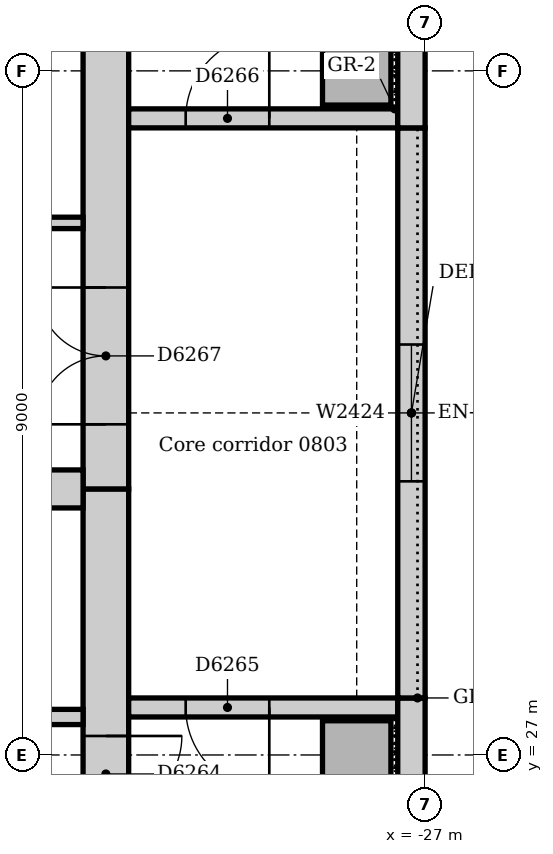
"""IFC4 building model, lengths in metres.
Left out: names, types, materials, properties, quantities, classifications, styles, units other than length and angle.
Written with IfcOpenShell. Run it as: python <this file> out.ifc"""

import sys

from ifc_helpers import new_model, si_unit, direction, frame, frame_2d, origin, origin_2d, place, context, subcontext, project, spatial, rectangle, extrude, element, fill, save


model = new_model("IFC4")
c1 = context("Model", 3, precision=1e-05, world=origin(), true_north=direction((0.0, 1.0)))
c2 = subcontext(c1, "Body", "Model", "MODEL_VIEW")
j1 = project(units=[si_unit("LENGTHUNIT", "METRE"), si_unit("PLANEANGLEUNIT", "RADIAN")], contexts=[c1])
p1 = place(None, origin())
s1 = spatial("IfcSite", under=j1, at=p1, CompositionType="ELEMENT")
p2 = place(p1, origin())
s2 = spatial("IfcBuilding", under=s1, at=p2, CompositionType="ELEMENT")
p3 = place(p2, frame((0.0, 0.0, 38.0)))
s3 = spatial("IfcBuildingStorey", under=s2, at=p3, CompositionType="ELEMENT", Elevation=38.0)
p4 = place(p3, frame((-31.2, 21.0, 0.0), z_axis=(0.0, 0.0, 1.0), x_axis=(0.0, 1.0, 0.0)))
e1 = element("IfcWall", 1, at=p4, inside=s3, PredefinedType="SOLIDWALL", context=c2, shape_type="SweptSolid", body=[
    extrude(rectangle(XDim=9.5, YDim=0.6, at=frame_2d((4.75, 0.0))), origin(), (0.0, 0.0, 1.0), 4.0),
])
p5 = place(p4, frame((5.25, 0.0, 0.0)))
e2 = element("IfcOpeningElement", 2, at=p5, cuts=e1, PredefinedType="OPENING", context=c2, shape_type="SweptSolid", body=[
    extrude(rectangle(XDim=1.0, YDim=2.1, at=frame_2d((0.5, 1.05))), frame((0.0, 0.31, 0.0), z_axis=(0.0, -1.0, 0.0), x_axis=(1.0, 0.0, 0.0)), (0.0, 0.0, 1.0), 0.62),
])
p6 = place(p3, frame((-31.2, 30.5, 0.0), z_axis=(0.0, 0.0, 1.0), x_axis=(0.0, 1.0, 0.0)))
e3 = element("IfcWall", 3, at=p6, inside=s3, PredefinedType="SOLIDWALL", context=c2, shape_type="SweptSolid", body=[
    extrude(rectangle(XDim=11.5, YDim=0.6, at=frame_2d((5.75, 0.0))), origin(), (0.0, 0.0, 1.0), 4.0),
])
p7 = place(p6, frame((0.85, 0.0, 0.0)))
e4 = element("IfcOpeningElement", 4, at=p7, cuts=e3, PredefinedType="OPENING", context=c2, shape_type="SweptSolid", body=[
    extrude(rectangle(XDim=1.8, YDim=2.1, at=frame_2d((0.9, 1.05))), frame((0.0, 0.31, 0.0), z_axis=(0.0, -1.0, 0.0), x_axis=(1.0, 0.0, 0.0)), (0.0, 0.0, 1.0), 0.62),
])
p8 = place(p3, frame((-42.0, 30.5, 0.0), z_axis=(0.0, 0.0, 1.0), x_axis=(1.0, 0.0, 0.0)))
e5 = element("IfcWall", 5, at=p8, inside=s3, PredefinedType="SOLIDWALL", context=c2, shape_type="SweptSolid", body=[
    extrude(rectangle(XDim=10.5, YDim=0.5, at=frame_2d((5.25, 0.0))), origin(), (0.0, 0.0, 1.0), 4.0),
])
p9 = place(p3, frame((-27.36, 27.625, 0.0), z_axis=(0.0, 0.0, 1.0), x_axis=(-1.0, 0.0, 0.0)))
e6 = element("IfcWall", 6, at=p9, inside=s3, PredefinedType="SOLIDWALL", context=c2, shape_type="SweptSolid", body=[
    extrude(rectangle(XDim=3.54, YDim=0.25, at=frame_2d((1.77, 0.0))), origin(), (0.0, 0.0, 1.0), 4.0),
])
p10 = place(p9, frame((1.69, 0.0, 0.0)))
e7 = element("IfcOpeningElement", 7, at=p10, cuts=e6, PredefinedType="OPENING", context=c2, shape_type="SweptSolid", body=[
    extrude(rectangle(XDim=1.1, YDim=2.1, at=frame_2d((0.55, 1.05))), frame((0.0, 0.135, 0.0), z_axis=(0.0, -1.0, 0.0), x_axis=(1.0, 0.0, 0.0)), (0.0, 0.0, 1.0), 0.27),
])
p11 = place(p3, frame((-30.9, 35.375, 0.0), z_axis=(0.0, 0.0, 1.0), x_axis=(1.0, 0.0, 0.0)))
e8 = element("IfcWall", 8, at=p11, inside=s3, PredefinedType="SOLIDWALL", context=c2, shape_type="SweptSolid", body=[
    extrude(rectangle(XDim=3.54, YDim=0.25, at=frame_2d((1.77, 0.0))), origin(), (0.0, 0.0, 1.0), 4.0),
])
p12 = place(p11, frame((0.75, 0.0, 0.0)))
e9 = element("IfcOpeningElement", 9, at=p12, cuts=e8, PredefinedType="OPENING", context=c2, shape_type="SweptSolid", body=[
    extrude(rectangle(XDim=1.1, YDim=2.1, at=frame_2d((0.55, 1.05))), frame((0.0, 0.135, 0.0), z_axis=(0.0, -1.0, 0.0), x_axis=(1.0, 0.0, 0.0)), (0.0, 0.0, 1.0), 0.27),
])
for number, where, z_axis, x_axis in (
    (10, (-27.9, 27.0, 0.0), (0.0, 0.0, 1.0), (1.0, 0.0, 0.0)),
    (11, (-27.9, 36.0, 0.0), (0.0, 0.0, 1.0), (1.0, 0.0, 0.0)),
):
    element("IfcColumn", number, at=place(p3, frame(where, z_axis=z_axis, x_axis=x_axis)), inside=s3, PredefinedType="COLUMN", context=c2, shape_type="SweptSolid", body=[
        extrude(rectangle(XDim=0.9, YDim=0.9, at=origin_2d()), origin(), (0.0, 0.0, 1.0), 4.0),
    ])
p13 = place(p3, frame((-27.18, 21.0, 0.0), z_axis=(0.0, 0.0, 1.0), x_axis=(0.0, 1.0, 0.0)))
e12 = element("IfcWall", 12, at=p13, inside=s3, PredefinedType="STANDARD", context=c2, shape_type="SweptSolid", body=[
    extrude(rectangle(XDim=6.75, YDim=0.36, at=frame_2d((3.375, 0.0))), origin(), (0.0, 0.0, 1.0), 3.85),
])
p14 = place(p3, frame((-27.18, 27.75, 0.0), z_axis=(0.0, 0.0, 1.0), x_axis=(0.0, 1.0, 0.0)))
e13 = element("IfcWall", 13, at=p14, inside=s3, PredefinedType="STANDARD", context=c2, shape_type="SweptSolid", body=[
    extrude(rectangle(XDim=7.5, YDim=0.36, at=frame_2d((3.75, 0.0))), origin(), (0.0, 0.0, 1.0), 3.85),
])
p15 = place(p14, frame((2.85, 0.0, 1.2)))
e14 = element("IfcOpeningElement", 14, at=p15, cuts=e13, PredefinedType="OPENING", context=c2, shape_type="SweptSolid", body=[
    extrude(rectangle(XDim=1.8, YDim=1.2, at=frame_2d((0.9, 0.6))), frame((0.0, 0.19, 0.0), z_axis=(0.0, -1.0, 0.0), x_axis=(1.0, 0.0, 0.0)), (0.0, 0.0, 1.0), 0.38),
])
p16 = place(p3, frame((-27.18, 35.25, 0.0), z_axis=(0.0, 0.0, 1.0), x_axis=(0.0, 1.0, 0.0)))
e15 = element("IfcWall", 15, at=p16, inside=s3, PredefinedType="STANDARD", context=c2, shape_type="SweptSolid", body=[
    extrude(rectangle(XDim=5.507, YDim=0.36, at=frame_2d((2.754, 0.0))), origin(), (0.0, 0.0, 1.0), 3.85),
])
p17 = place(p3, frame((-34.9, 27.5, 0.0), z_axis=(0.0, 0.0, 1.0), x_axis=(1.0, 0.0, 0.0)))
e16 = element("IfcWall", 16, at=p17, inside=s3, PredefinedType="SOLIDWALL", context=c2, shape_type="SweptSolid", body=[
    extrude(rectangle(XDim=3.4, YDim=0.2, at=frame_2d((1.7, 0.0))), origin(), (0.0, 0.0, 1.0), 4.0),
])
p18 = place(p17, frame((1.1, 0.0, 0.0)))
e17 = element("IfcOpeningElement", 17, at=p18, cuts=e16, PredefinedType="OPENING", context=c2, shape_type="SweptSolid", body=[
    extrude(rectangle(XDim=1.1, YDim=2.1, at=frame_2d((0.55, 1.05))), frame((0.0, 0.11, 0.0), z_axis=(0.0, -1.0, 0.0), x_axis=(1.0, 0.0, 0.0)), (0.0, 0.0, 1.0), 0.22),
])
p19 = place(p3, frame((-34.075, 34.0, 0.0), z_axis=(0.0, 0.0, 1.0), x_axis=(1.0, 0.0, 0.0)))
e18 = element("IfcWall", 18, at=p19, inside=s3, PredefinedType="SOLIDWALL", context=c2, shape_type="SweptSolid", body=[
    extrude(rectangle(XDim=2.575, YDim=0.15, at=frame_2d((1.288, 0.0))), origin(), (0.0, 0.0, 1.0), 4.0),
])
p20 = place(p15, origin())
e19 = element("IfcWindow", 19, at=p20, inside=s3, PartitioningType="SINGLE_PANEL", PredefinedType="WINDOW", context=c2, shape_type="SweptSolid", body=[
    extrude(rectangle(XDim=1.8, YDim=1.2, at=frame_2d((0.9, 0.6))), frame((0.0, 0.13, 0.0), z_axis=(0.0, -1.0, 0.0), x_axis=(1.0, 0.0, 0.0)), (0.0, 0.0, 1.0), 0.06),
])
fill(e14, e19)
p21 = place(p5, frame((1.0, 0.0, 0.0), z_axis=(0.0, 0.0, 1.0), x_axis=(-1.0, 0.0, 0.0)))
e20 = element("IfcDoor", 20, at=p21, inside=s3, OperationType="SINGLE_SWING_LEFT", PredefinedType="DOOR", context=c2, shape_type="SweptSolid", body=[
    extrude(rectangle(XDim=1.0, YDim=2.1, at=frame_2d((0.5, 1.05))), frame((0.0, 0.025, 0.0), z_axis=(0.0, -1.0, 0.0), x_axis=(1.0, 0.0, 0.0)), (0.0, 0.0, 1.0), 0.05),
])
fill(e2, e20)
p22 = place(p10, origin())
e21 = element("IfcDoor", 21, at=p22, inside=s3, OperationType="SINGLE_SWING_LEFT", PredefinedType="DOOR", context=c2, shape_type="SweptSolid", body=[
    extrude(rectangle(XDim=1.1, YDim=2.1, at=frame_2d((0.55, 1.05))), frame((0.0, 0.025, 0.0), z_axis=(0.0, -1.0, 0.0), x_axis=(1.0, 0.0, 0.0)), (0.0, 0.0, 1.0), 0.05),
])
fill(e7, e21)
p23 = place(p12, origin())
e22 = element("IfcDoor", 22, at=p23, inside=s3, OperationType="SINGLE_SWING_RIGHT", PredefinedType="DOOR", context=c2, shape_type="SweptSolid", body=[
    extrude(rectangle(XDim=1.1, YDim=2.1, at=frame_2d((0.55, 1.05))), frame((0.0, 0.025, 0.0), z_axis=(0.0, -1.0, 0.0), x_axis=(1.0, 0.0, 0.0)), (0.0, 0.0, 1.0), 0.05),
])
fill(e9, e22)
p24 = place(p7, origin())
e23 = element("IfcDoor", 23, at=p24, inside=s3, OperationType="DOUBLE_DOOR_SINGLE_SWING", PredefinedType="DOOR", context=c2, shape_type="SweptSolid", body=[
    extrude(rectangle(XDim=1.8, YDim=2.1, at=frame_2d((0.9, 1.05))), frame((0.0, 0.025, 0.0), z_axis=(0.0, -1.0, 0.0), x_axis=(1.0, 0.0, 0.0)), (0.0, 0.0, 1.0), 0.05),
])
fill(e4, e23)
save(model, sys.argv[1])
